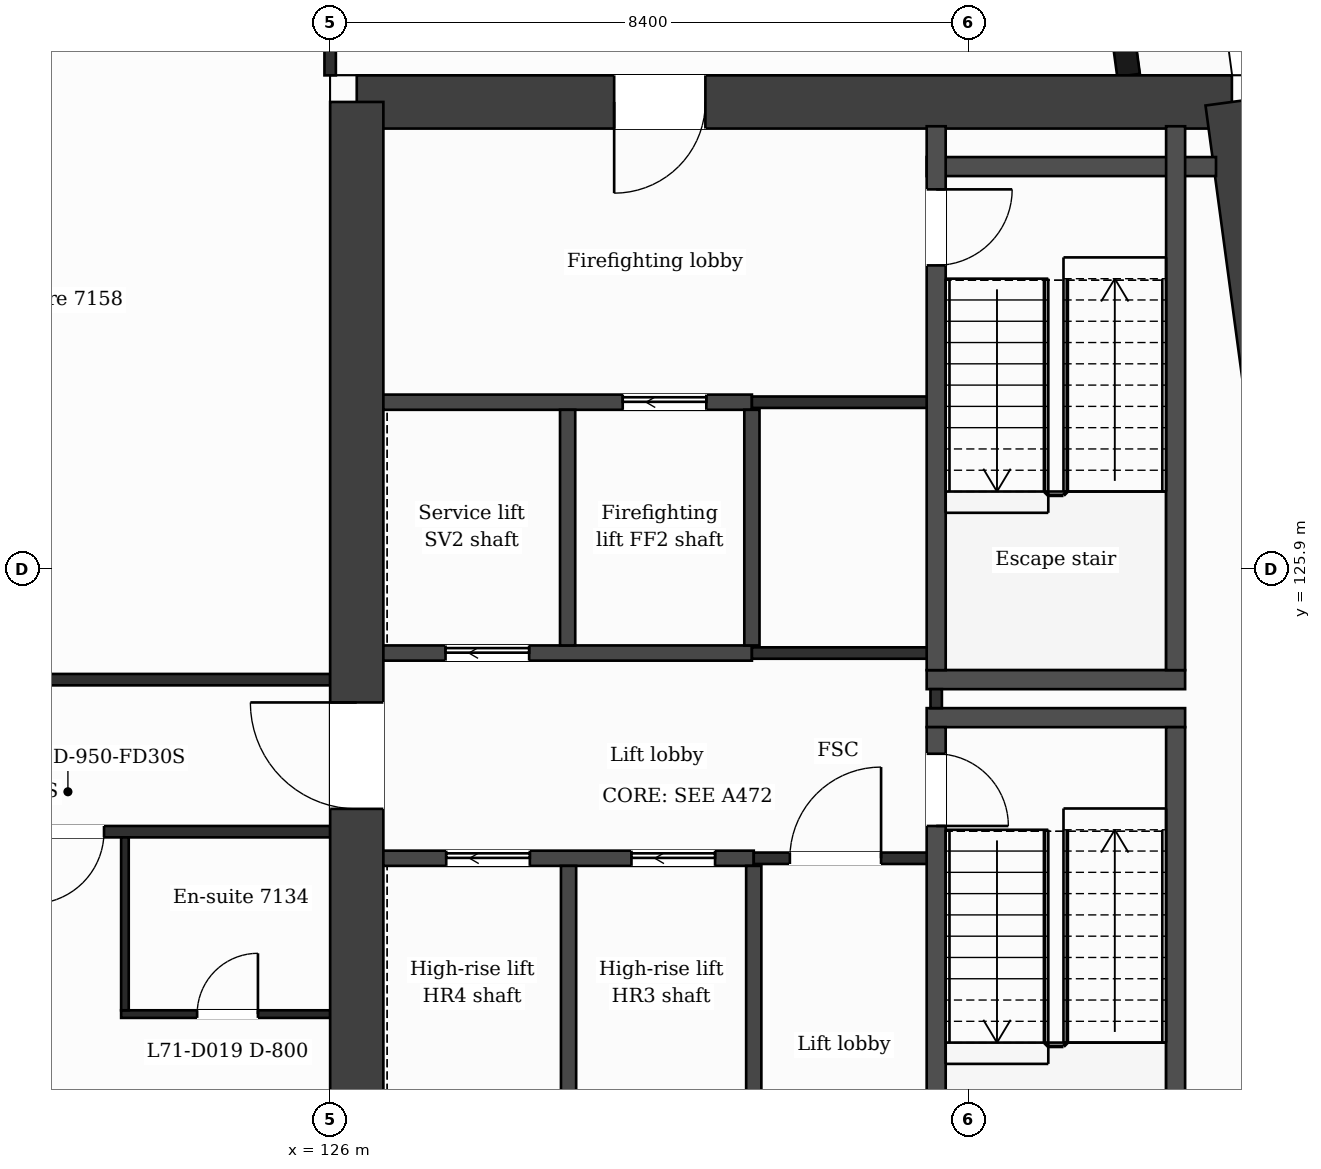
"""IFC4 building model, lengths in metres.
Left out: names, types, materials, properties, quantities, classifications, styles, units other than length and angle.
Written with IfcOpenShell. Run it as: python <this file> out.ifc"""

import sys

from ifc_helpers import new_model, si_unit, direction, frame, frame_2d, origin, place, context, subcontext, project, spatial, rectangle, extrude, element, fill, save


model = new_model("IFC4")
c1 = context("Model", 3, precision=1e-05, world=origin(), true_north=direction((0.0, 1.0)))
c2 = subcontext(c1, "Body", "Model", "MODEL_VIEW")
j1 = project(units=[si_unit("LENGTHUNIT", "METRE"), si_unit("PLANEANGLEUNIT", "RADIAN")], contexts=[c1])
p1 = place(None, origin())
s1 = spatial("IfcSite", under=j1, at=p1, CompositionType="ELEMENT")
p2 = place(p1, origin())
s2 = spatial("IfcBuilding", under=s1, at=p2, CompositionType="ELEMENT")
p3 = place(p2, frame((0.0, 0.0, 292.3)))
s3 = spatial("IfcBuildingStorey", under=s2, at=p3, CompositionType="ELEMENT", Elevation=292.3)
p4 = place(p3, frame((126.35, 132.05, 0.0), z_axis=(0.0, 0.0, 1.0), x_axis=(1.0, 0.0, 0.0)))
e1 = element("IfcWall", 1, at=p4, inside=s3, PredefinedType="SHEAR", context=c2, shape_type="SweptSolid", body=[
    extrude(rectangle(XDim=11.513, YDim=0.7, at=frame_2d((5.757, 0.0))), origin(), (0.0, 0.0, 1.0), 3.7),
])
p5 = place(p4, frame((3.386, 0.0, 0.0)))
e2 = element("IfcOpeningElement", 2, at=p5, cuts=e1, PredefinedType="OPENING", context=c2, shape_type="SweptSolid", body=[
    extrude(rectangle(XDim=1.2, YDim=2.1, at=frame_2d((0.6, 1.05))), frame((0.0, 0.36, 0.0), z_axis=(0.0, -1.0, 0.0), x_axis=(1.0, 0.0, 0.0)), (0.0, 0.0, 1.0), 0.72),
])
p6 = place(p3, frame((137.863, 132.05, 0.0), z_axis=(0.0, 0.0, 1.0), x_axis=(0.133401241494, -0.991062111458, 0.0)))
e3 = element("IfcWall", 3, at=p6, inside=s3, PredefinedType="SHEAR", context=c2, shape_type="SweptSolid", body=[
    extrude(rectangle(XDim=15.842, YDim=0.7, at=frame_2d((7.921, 0.0))), origin(), (0.0, 0.0, 1.0), 3.7),
])
p7 = place(p3, frame((126.35, 116.35, 0.0), z_axis=(0.0, 0.0, 1.0), x_axis=(0.0, 1.0, 0.0)))
e4 = element("IfcWall", 4, at=p7, inside=s3, PredefinedType="SHEAR", context=c2, shape_type="SweptSolid", body=[
    extrude(rectangle(XDim=15.7, YDim=0.7, at=frame_2d((7.85, 0.0))), origin(), (0.0, 0.0, 1.0), 3.7),
])
p8 = place(p7, frame((6.4, 0.0, 0.0)))
e5 = element("IfcOpeningElement", 5, at=p8, cuts=e4, PredefinedType="OPENING", context=c2, shape_type="SweptSolid", body=[
    extrude(rectangle(XDim=1.4, YDim=2.1, at=frame_2d((0.7, 1.05))), frame((0.0, 0.36, 0.0), z_axis=(0.0, -1.0, 0.0), x_axis=(1.0, 0.0, 0.0)), (0.0, 0.0, 1.0), 0.72),
])
p9 = place(p3, frame((136.504, 132.4, 0.0), z_axis=(0.0, 0.0, 1.0), x_axis=(-0.133399697462, 0.99106231929, 0.0)))
e6 = element("IfcWall", 6, at=p9, inside=s3, PredefinedType="SOLIDWALL", context=c2, shape_type="SweptSolid", body=[
    extrude(rectangle(XDim=6.74, YDim=0.3, at=frame_2d((3.37, 0.0))), origin(), (0.0, 0.0, 1.0), 3.38),
])
p10 = place(p9, frame((1.115, 0.0, 0.0)))
e7 = element("IfcOpeningElement", 7, at=p10, cuts=e6, PredefinedType="OPENING", context=c2, shape_type="SweptSolid", body=[
    extrude(rectangle(XDim=1.2, YDim=2.4, at=frame_2d((0.6, 1.2))), frame((0.0, 0.16, 0.0), z_axis=(0.0, -1.0, 0.0), x_axis=(1.0, 0.0, 0.0)), (0.0, 0.0, 1.0), 0.32),
])
p11 = place(p9, frame((3.835, 0.0, 0.9)))
e8 = element("IfcOpeningElement", 8, at=p11, cuts=e6, PredefinedType="OPENING", context=c2, shape_type="SweptSolid", body=[
    extrude(rectangle(XDim=2.4, YDim=2.1, at=frame_2d((1.2, 1.05))), frame((0.0, 0.16, 0.0), z_axis=(0.0, -1.0, 0.0), x_axis=(1.0, 0.0, 0.0)), (0.0, 0.0, 1.0), 0.32),
])
p12 = place(p3, frame((123.25, 120.05, 0.0), z_axis=(0.0, 0.0, 1.0), x_axis=(1.0, 0.0, 0.0)))
e9 = element("IfcWall", 9, at=p12, inside=s3, PredefinedType="PARTITIONING", context=c2, shape_type="SweptSolid", body=[
    extrude(rectangle(XDim=2.75, YDim=0.1, at=frame_2d((1.375, 0.0))), origin(), (0.0, 0.0, 1.0), 3.38),
])
p13 = place(p12, frame((1.0, 0.0, 0.0)))
e10 = element("IfcOpeningElement", 10, at=p13, cuts=e9, PredefinedType="OPENING", context=c2, shape_type="SweptSolid", body=[
    extrude(rectangle(XDim=0.8, YDim=2.1, at=frame_2d((0.4, 1.05))), frame((0.0, 0.06, 0.0), z_axis=(0.0, -1.0, 0.0), x_axis=(1.0, 0.0, 0.0)), (0.0, 0.0, 1.0), 0.12),
])
p14 = place(p3, frame((126.7, 122.1, 0.0), z_axis=(0.0, 0.0, 1.0), x_axis=(1.0, 0.0, 0.0)))
e11 = element("IfcWall", 11, at=p14, inside=s3, PredefinedType="PARTITIONING", context=c2, shape_type="SweptSolid", body=[
    extrude(rectangle(XDim=4.873, YDim=0.2, at=frame_2d((2.437, 0.0))), origin(), (0.0, 0.0, 1.0), 3.38),
])
p15 = place(p14, frame((3.264, 0.0, 0.0)))
e12 = element("IfcOpeningElement", 12, at=p15, cuts=e11, PredefinedType="OPENING", context=c2, shape_type="SweptSolid", body=[
    extrude(rectangle(XDim=1.1, YDim=2.1, at=frame_2d((0.55, 1.05))), frame((0.0, 0.11, 0.0), z_axis=(0.0, -1.0, 0.0), x_axis=(1.0, 0.0, 0.0)), (0.0, 0.0, 1.0), 0.22),
])
p16 = place(p14, frame((0.827, 0.0, 0.0)))
e13 = element("IfcOpeningElement", 13, at=p16, cuts=e11, PredefinedType="OPENING", context=c2, shape_type="SweptSolid", body=[
    extrude(rectangle(XDim=1.1, YDim=2.1, at=frame_2d((0.55, 1.05))), frame((0.0, 0.11, 0.0), z_axis=(0.0, -1.0, 0.0), x_axis=(1.0, 0.0, 0.0)), (0.0, 0.0, 1.0), 0.22),
])
p17 = place(p3, frame((131.573, 122.1, 0.0), z_axis=(0.0, 0.0, 1.0), x_axis=(1.0, 0.0, 0.0)))
e14 = element("IfcWall", 14, at=p17, inside=s3, PredefinedType="PARTITIONING", context=c2, shape_type="SweptSolid", body=[
    extrude(rectangle(XDim=2.4, YDim=0.15, at=frame_2d((1.2, 0.0))), origin(), (0.0, 0.0, 1.0), 3.38),
])
p18 = place(p17, frame((0.475, 0.0, 0.0)))
e15 = element("IfcOpeningElement", 15, at=p18, cuts=e14, PredefinedType="OPENING", context=c2, shape_type="SweptSolid", body=[
    extrude(rectangle(XDim=1.2, YDim=2.1, at=frame_2d((0.6, 1.05))), frame((0.0, 0.085, 0.0), z_axis=(0.0, -1.0, 0.0), x_axis=(1.0, 0.0, 0.0)), (0.0, 0.0, 1.0), 0.17),
])
p19 = place(p3, frame((100.8, 122.45, 0.0), z_axis=(0.0, 0.0, 1.0), x_axis=(1.0, 0.0, 0.0)))
e16 = element("IfcWall", 16, at=p19, inside=s3, PredefinedType="PARTITIONING", context=c2, shape_type="SweptSolid", body=[
    extrude(rectangle(XDim=25.2, YDim=0.15, at=frame_2d((12.6, 0.0))), origin(), (0.0, 0.0, 1.0), 3.38),
])
p20 = place(p19, frame((1.6, 0.0, 0.0)))
e17 = element("IfcOpeningElement", 17, at=p20, cuts=e16, PredefinedType="OPENING", context=c2, shape_type="SweptSolid", body=[
    extrude(rectangle(XDim=1.0, YDim=2.1, at=frame_2d((0.5, 1.05))), frame((0.0, 0.085, 0.0), z_axis=(0.0, -1.0, 0.0), x_axis=(1.0, 0.0, 0.0)), (0.0, 0.0, 1.0), 0.17),
])
p21 = place(p19, frame((11.12, 0.0, 0.0)))
e18 = element("IfcOpeningElement", 18, at=p21, cuts=e16, PredefinedType="OPENING", context=c2, shape_type="SweptSolid", body=[
    extrude(rectangle(XDim=0.95, YDim=2.1, at=frame_2d((0.475, 1.05))), frame((0.0, 0.085, 0.0), z_axis=(0.0, -1.0, 0.0), x_axis=(1.0, 0.0, 0.0)), (0.0, 0.0, 1.0), 0.17),
])
p22 = place(p19, frame((13.05, 0.0, 0.0)))
e19 = element("IfcOpeningElement", 19, at=p22, cuts=e16, PredefinedType="OPENING", context=c2, shape_type="SweptSolid", body=[
    extrude(rectangle(XDim=1.0, YDim=2.1, at=frame_2d((0.5, 1.05))), frame((0.0, 0.085, 0.0), z_axis=(0.0, -1.0, 0.0), x_axis=(1.0, 0.0, 0.0)), (0.0, 0.0, 1.0), 0.17),
])
p23 = place(p19, frame((19.61, 0.0, 0.0)))
e20 = element("IfcOpeningElement", 20, at=p23, cuts=e16, PredefinedType="OPENING", context=c2, shape_type="SweptSolid", body=[
    extrude(rectangle(XDim=0.95, YDim=2.1, at=frame_2d((0.475, 1.05))), frame((0.0, 0.085, 0.0), z_axis=(0.0, -1.0, 0.0), x_axis=(1.0, 0.0, 0.0)), (0.0, 0.0, 1.0), 0.17),
])
p24 = place(p19, frame((21.275, 0.0, 0.0)))
e21 = element("IfcOpeningElement", 21, at=p24, cuts=e16, PredefinedType="OPENING", context=c2, shape_type="SweptSolid", body=[
    extrude(rectangle(XDim=0.95, YDim=2.1, at=frame_2d((0.475, 1.05))), frame((0.0, 0.085, 0.0), z_axis=(0.0, -1.0, 0.0), x_axis=(1.0, 0.0, 0.0)), (0.0, 0.0, 1.0), 0.17),
])
for number, where, z_axis, x_axis in (
    (22, (133.848, 123.95, 0.0), (0.0, 0.0, 1.0), (1.0, 0.0, 0.0)),
    (23, (133.848, 124.45, 0.0), (0.0, 0.0, 1.0), (1.0, 0.0, 0.0)),
):
    element("IfcWall", number, at=place(p3, frame(where, z_axis=z_axis, x_axis=x_axis)), inside=s3, PredefinedType="PARTITIONING", context=c2, shape_type="SweptSolid", body=[
        extrude(rectangle(XDim=3.4, YDim=0.25, at=frame_2d((1.7, 0.0))), origin(), (0.0, 0.0, 1.0), 3.38),
    ])
p25 = place(p3, frame((100.8, 124.45, 0.0), z_axis=(0.0, 0.0, 1.0), x_axis=(1.0, 0.0, 0.0)))
e24 = element("IfcWall", 24, at=p25, inside=s3, PredefinedType="PARTITIONING", context=c2, shape_type="SweptSolid", body=[
    extrude(rectangle(XDim=25.2, YDim=0.15, at=frame_2d((12.6, 0.0))), origin(), (0.0, 0.0, 1.0), 3.38),
])
p26 = place(p25, frame((1.85, 0.0, 0.0)))
e25 = element("IfcOpeningElement", 25, at=p26, cuts=e24, PredefinedType="OPENING", context=c2, shape_type="SweptSolid", body=[
    extrude(rectangle(XDim=1.0, YDim=2.1, at=frame_2d((0.5, 1.05))), frame((0.0, 0.085, 0.0), z_axis=(0.0, -1.0, 0.0), x_axis=(1.0, 0.0, 0.0)), (0.0, 0.0, 1.0), 0.17),
])
p27 = place(p25, frame((6.425, 0.0, 0.0)))
e26 = element("IfcOpeningElement", 26, at=p27, cuts=e24, PredefinedType="OPENING", context=c2, shape_type="SweptSolid", body=[
    extrude(rectangle(XDim=1.0, YDim=2.1, at=frame_2d((0.5, 1.05))), frame((0.0, 0.085, 0.0), z_axis=(0.0, -1.0, 0.0), x_axis=(1.0, 0.0, 0.0)), (0.0, 0.0, 1.0), 0.17),
])
p28 = place(p25, frame((9.4, 0.0, 0.0)))
e27 = element("IfcOpeningElement", 27, at=p28, cuts=e24, PredefinedType="OPENING", context=c2, shape_type="SweptSolid", body=[
    extrude(rectangle(XDim=1.0, YDim=2.1, at=frame_2d((0.5, 1.05))), frame((0.0, 0.085, 0.0), z_axis=(0.0, -1.0, 0.0), x_axis=(1.0, 0.0, 0.0)), (0.0, 0.0, 1.0), 0.17),
])
p29 = place(p25, frame((14.825, 0.0, 0.0)))
e28 = element("IfcOpeningElement", 28, at=p29, cuts=e24, PredefinedType="OPENING", context=c2, shape_type="SweptSolid", body=[
    extrude(rectangle(XDim=1.0, YDim=2.1, at=frame_2d((0.5, 1.05))), frame((0.0, 0.085, 0.0), z_axis=(0.0, -1.0, 0.0), x_axis=(1.0, 0.0, 0.0)), (0.0, 0.0, 1.0), 0.17),
])
p30 = place(p25, frame((18.825, 0.0, 0.0)))
e29 = element("IfcOpeningElement", 29, at=p30, cuts=e24, PredefinedType="OPENING", context=c2, shape_type="SweptSolid", body=[
    extrude(rectangle(XDim=1.0, YDim=2.1, at=frame_2d((0.5, 1.05))), frame((0.0, 0.085, 0.0), z_axis=(0.0, -1.0, 0.0), x_axis=(1.0, 0.0, 0.0)), (0.0, 0.0, 1.0), 0.17),
])
p31 = place(p3, frame((126.7, 124.8, 0.0), z_axis=(0.0, 0.0, 1.0), x_axis=(1.0, 0.0, 0.0)))
e30 = element("IfcWall", 30, at=p31, inside=s3, PredefinedType="PARTITIONING", context=c2, shape_type="SweptSolid", body=[
    extrude(rectangle(XDim=4.849, YDim=0.2, at=frame_2d((2.424, 0.0))), origin(), (0.0, 0.0, 1.0), 3.38),
])
p32 = place(p31, frame((0.818, 0.0, 0.0)))
e31 = element("IfcOpeningElement", 31, at=p32, cuts=e30, PredefinedType="OPENING", context=c2, shape_type="SweptSolid", body=[
    extrude(rectangle(XDim=1.1, YDim=2.1, at=frame_2d((0.55, 1.05))), frame((0.0, 0.11, 0.0), z_axis=(0.0, -1.0, 0.0), x_axis=(1.0, 0.0, 0.0)), (0.0, 0.0, 1.0), 0.22),
])
p33 = place(p3, frame((131.549, 124.8, 0.0), z_axis=(0.0, 0.0, 1.0), x_axis=(1.0, 0.0, 0.0)))
e32 = element("IfcWall", 32, at=p33, inside=s3, PredefinedType="PARTITIONING", context=c2, shape_type="SweptSolid", body=[
    extrude(rectangle(XDim=2.549, YDim=0.15, at=frame_2d((1.275, 0.0))), origin(), (0.0, 0.0, 1.0), 3.38),
])
p34 = place(p3, frame((126.7, 128.1, 0.0), z_axis=(0.0, 0.0, 1.0), x_axis=(1.0, 0.0, 0.0)))
e33 = element("IfcWall", 33, at=p34, inside=s3, PredefinedType="PARTITIONING", context=c2, shape_type="SweptSolid", body=[
    extrude(rectangle(XDim=4.849, YDim=0.2, at=frame_2d((2.424, 0.0))), origin(), (0.0, 0.0, 1.0), 3.38),
])
p35 = place(p34, frame((3.149, 0.0, 0.0)))
e34 = element("IfcOpeningElement", 34, at=p35, cuts=e33, PredefinedType="OPENING", context=c2, shape_type="SweptSolid", body=[
    extrude(rectangle(XDim=1.1, YDim=2.1, at=frame_2d((0.55, 1.05))), frame((0.0, 0.11, 0.0), z_axis=(0.0, -1.0, 0.0), x_axis=(1.0, 0.0, 0.0)), (0.0, 0.0, 1.0), 0.22),
])
p36 = place(p3, frame((131.549, 128.1, 0.0), z_axis=(0.0, 0.0, 1.0), x_axis=(1.0, 0.0, 0.0)))
e35 = element("IfcWall", 35, at=p36, inside=s3, PredefinedType="PARTITIONING", context=c2, shape_type="SweptSolid", body=[
    extrude(rectangle(XDim=2.424, YDim=0.15, at=frame_2d((1.212, 0.0))), origin(), (0.0, 0.0, 1.0), 3.38),
])
p37 = place(p3, frame((133.848, 131.2, 0.0), z_axis=(0.0, 0.0, 1.0), x_axis=(1.0, 0.0, 0.0)))
e36 = element("IfcWall", 36, at=p37, inside=s3, PredefinedType="PARTITIONING", context=c2, shape_type="SweptSolid", body=[
    extrude(rectangle(XDim=3.807, YDim=0.25, at=frame_2d((1.903, 0.0))), origin(), (0.0, 0.0, 1.0), 3.38),
])
p38 = place(p3, frame((123.3, 120.1, 0.0), z_axis=(0.0, 0.0, 1.0), x_axis=(0.0, 1.0, 0.0)))
e37 = element("IfcWall", 37, at=p38, inside=s3, PredefinedType="PARTITIONING", context=c2, shape_type="SweptSolid", body=[
    extrude(rectangle(XDim=2.275, YDim=0.1, at=frame_2d((1.137, 0.0))), origin(), (0.0, 0.0, 1.0), 3.38),
])
p39 = place(p3, frame((126.0, 132.4, 0.0), z_axis=(0.0, 0.0, 1.0), x_axis=(0.0, 1.0, 0.0)))
e38 = element("IfcWall", 38, at=p39, inside=s3, PredefinedType="PARTITIONING", context=c2, shape_type="SweptSolid", body=[
    extrude(rectangle(XDim=1.325, YDim=0.15, at=frame_2d((0.663, 0.0))), origin(), (0.0, 0.0, 1.0), 3.38),
])
for number, where, z_axis, x_axis in (
    (39, (129.124, 124.9, 0.0), (0.0, 0.0, 1.0), (0.0, 1.0, 0.0)),
    (40, (129.136, 118.9, 0.0), (0.0, 0.0, 1.0), (0.0, 1.0, 0.0)),
    (41, (131.549, 124.9, 0.0), (0.0, 0.0, 1.0), (0.0, 1.0, 0.0)),
):
    element("IfcWall", number, at=place(p3, frame(where, z_axis=z_axis, x_axis=x_axis)), inside=s3, PredefinedType="PARTITIONING", context=c2, shape_type="SweptSolid", body=[
        extrude(rectangle(XDim=3.1, YDim=0.2, at=frame_2d((1.55, 0.0))), origin(), (0.0, 0.0, 1.0), 3.38),
    ])
p40 = place(p3, frame((131.573, 116.67, 0.0), z_axis=(0.0, 0.0, 1.0), x_axis=(0.0, 1.0, 0.0)))
e42 = element("IfcWall", 42, at=p40, inside=s3, PredefinedType="PARTITIONING", context=c2, shape_type="SweptSolid", body=[
    extrude(rectangle(XDim=5.33, YDim=0.2, at=frame_2d((2.665, 0.0))), origin(), (0.0, 0.0, 1.0), 3.38),
])
p41 = place(p40, frame((0.88, 0.0, 0.0)))
e43 = element("IfcOpeningElement", 43, at=p41, cuts=e42, PredefinedType="OPENING", context=c2, shape_type="SweptSolid", body=[
    extrude(rectangle(XDim=0.9, YDim=2.1, at=frame_2d((0.45, 1.05))), frame((0.0, 0.11, 0.0), z_axis=(0.0, -1.0, 0.0), x_axis=(1.0, 0.0, 0.0)), (0.0, 0.0, 1.0), 0.22),
])
p42 = place(p3, frame((133.973, 124.075, 0.0), z_axis=(0.0, 0.0, 1.0), x_axis=(0.0, 1.0, 0.0)))
e44 = element("IfcWall", 44, at=p42, inside=s3, PredefinedType="PARTITIONING", context=c2, shape_type="SweptSolid", body=[
    extrude(rectangle(XDim=0.25, YDim=0.15, at=frame_2d((0.125, 0.0))), origin(), (0.0, 0.0, 1.0), 3.38),
])
p43 = place(p3, frame((133.973, 116.67, 0.0), z_axis=(0.0, 0.0, 1.0), x_axis=(0.0, 1.0, 0.0)))
e45 = element("IfcWall", 45, at=p43, inside=s3, PredefinedType="PARTITIONING", context=c2, shape_type="SweptSolid", body=[
    extrude(rectangle(XDim=7.155, YDim=0.25, at=frame_2d((3.578, 0.0))), origin(), (0.0, 0.0, 1.0), 3.38),
])
p44 = place(p43, frame((5.855, 0.0, 0.0)))
e46 = element("IfcOpeningElement", 46, at=p44, cuts=e45, PredefinedType="OPENING", context=c2, shape_type="SweptSolid", body=[
    extrude(rectangle(XDim=0.95, YDim=2.1, at=frame_2d((0.475, 1.05))), frame((0.0, 0.135, 0.0), z_axis=(0.0, -1.0, 0.0), x_axis=(1.0, 0.0, 0.0)), (0.0, 0.0, 1.0), 0.27),
])
p45 = place(p3, frame((133.973, 124.575, 0.0), z_axis=(0.0, 0.0, 1.0), x_axis=(0.0, 1.0, 0.0)))
e47 = element("IfcWall", 47, at=p45, inside=s3, PredefinedType="PARTITIONING", context=c2, shape_type="SweptSolid", body=[
    extrude(rectangle(XDim=7.155, YDim=0.25, at=frame_2d((3.578, 0.0))), origin(), (0.0, 0.0, 1.0), 3.38),
])
p46 = place(p45, frame((5.325, 0.0, 0.0)))
e48 = element("IfcOpeningElement", 48, at=p46, cuts=e47, PredefinedType="OPENING", context=c2, shape_type="SweptSolid", body=[
    extrude(rectangle(XDim=1.0, YDim=2.1, at=frame_2d((0.5, 1.05))), frame((0.0, 0.135, 0.0), z_axis=(0.0, -1.0, 0.0), x_axis=(1.0, 0.0, 0.0)), (0.0, 0.0, 1.0), 0.27),
])
for number, where, z_axis, x_axis in (
    (49, (137.123, 116.67, 0.0), (0.0, 0.0, 1.0), (0.0, 1.0, 0.0)),
    (50, (137.123, 124.575, 0.0), (0.0, 0.0, 1.0), (0.0, 1.0, 0.0)),
):
    element("IfcWall", number, at=place(p3, frame(where, z_axis=z_axis, x_axis=x_axis)), inside=s3, PredefinedType="PARTITIONING", context=c2, shape_type="SweptSolid", body=[
        extrude(rectangle(XDim=7.155, YDim=0.25, at=frame_2d((3.578, 0.0))), origin(), (0.0, 0.0, 1.0), 3.38),
    ])
p47 = place(p18, origin())
e51 = element("IfcDoor", 51, at=p47, inside=s3, OperationType="SINGLE_SWING_RIGHT", PredefinedType="DOOR", context=c2, shape_type="SweptSolid", body=[
    extrude(rectangle(XDim=1.2, YDim=2.1, at=frame_2d((0.6, 1.05))), frame((0.0, 0.025, 0.0), z_axis=(0.0, -1.0, 0.0), x_axis=(1.0, 0.0, 0.0)), (0.0, 0.0, 1.0), 0.05),
])
fill(e15, e51)
p48 = place(p15, origin())
e52 = element("IfcDoor", 52, at=p48, inside=s3, OperationType="SLIDING_TO_LEFT", PredefinedType="DOOR", context=c2, shape_type="SweptSolid", body=[
    extrude(rectangle(XDim=1.1, YDim=2.1, at=frame_2d((0.55, 1.05))), frame((0.0, 0.025, 0.0), z_axis=(0.0, -1.0, 0.0), x_axis=(1.0, 0.0, 0.0)), (0.0, 0.0, 1.0), 0.05),
])
fill(e12, e52)
p49 = place(p16, origin())
e53 = element("IfcDoor", 53, at=p49, inside=s3, OperationType="SLIDING_TO_LEFT", PredefinedType="DOOR", context=c2, shape_type="SweptSolid", body=[
    extrude(rectangle(XDim=1.1, YDim=2.1, at=frame_2d((0.55, 1.05))), frame((0.0, 0.025, 0.0), z_axis=(0.0, -1.0, 0.0), x_axis=(1.0, 0.0, 0.0)), (0.0, 0.0, 1.0), 0.05),
])
fill(e13, e53)
p50 = place(p35, origin())
e54 = element("IfcDoor", 54, at=p50, inside=s3, OperationType="SLIDING_TO_LEFT", PredefinedType="DOOR", context=c2, shape_type="SweptSolid", body=[
    extrude(rectangle(XDim=1.1, YDim=2.1, at=frame_2d((0.55, 1.05))), frame((0.0, 0.025, 0.0), z_axis=(0.0, -1.0, 0.0), x_axis=(1.0, 0.0, 0.0)), (0.0, 0.0, 1.0), 0.05),
])
fill(e34, e54)
p51 = place(p32, origin())
e55 = element("IfcDoor", 55, at=p51, inside=s3, OperationType="SLIDING_TO_LEFT", PredefinedType="DOOR", context=c2, shape_type="SweptSolid", body=[
    extrude(rectangle(XDim=1.1, YDim=2.1, at=frame_2d((0.55, 1.05))), frame((0.0, 0.025, 0.0), z_axis=(0.0, -1.0, 0.0), x_axis=(1.0, 0.0, 0.0)), (0.0, 0.0, 1.0), 0.05),
])
fill(e31, e55)
p52 = place(p44, origin())
e56 = element("IfcDoor", 56, at=p52, inside=s3, OperationType="SINGLE_SWING_LEFT", PredefinedType="DOOR", context=c2, shape_type="SweptSolid", body=[
    extrude(rectangle(XDim=0.95, YDim=2.1, at=frame_2d((0.475, 1.05))), frame((0.0, 0.025, 0.0), z_axis=(0.0, -1.0, 0.0), x_axis=(1.0, 0.0, 0.0)), (0.0, 0.0, 1.0), 0.05),
])
fill(e46, e56)
p53 = place(p46, origin())
e57 = element("IfcDoor", 57, at=p53, inside=s3, OperationType="SINGLE_SWING_RIGHT", PredefinedType="DOOR", context=c2, shape_type="SweptSolid", body=[
    extrude(rectangle(XDim=1.0, YDim=2.1, at=frame_2d((0.5, 1.05))), frame((0.0, 0.025, 0.0), z_axis=(0.0, -1.0, 0.0), x_axis=(1.0, 0.0, 0.0)), (0.0, 0.0, 1.0), 0.05),
])
fill(e48, e57)
p54 = place(p24, origin())
e58 = element("IfcDoor", 58, at=p54, inside=s3, OperationType="SINGLE_SWING_LEFT", PredefinedType="DOOR", context=c2, shape_type="SweptSolid", body=[
    extrude(rectangle(XDim=0.95, YDim=2.1, at=frame_2d((0.475, 1.05))), frame((0.0, 0.025, 0.0), z_axis=(0.0, -1.0, 0.0), x_axis=(1.0, 0.0, 0.0)), (0.0, 0.0, 1.0), 0.05),
])
fill(e21, e58)
p55 = place(p13, origin())
e59 = element("IfcDoor", 59, at=p55, inside=s3, OperationType="SINGLE_SWING_RIGHT", PredefinedType="DOOR", context=c2, shape_type="SweptSolid", body=[
    extrude(rectangle(XDim=0.8, YDim=2.1, at=frame_2d((0.4, 1.05))), frame((0.0, 0.025, 0.0), z_axis=(0.0, -1.0, 0.0), x_axis=(1.0, 0.0, 0.0)), (0.0, 0.0, 1.0), 0.05),
])
fill(e10, e59)
p56 = place(p5, origin())
e60 = element("IfcDoor", 60, at=p56, inside=s3, OperationType="SINGLE_SWING_LEFT", PredefinedType="DOOR", context=c2, shape_type="SweptSolid", body=[
    extrude(rectangle(XDim=1.2, YDim=2.1, at=frame_2d((0.6, 1.05))), frame((0.0, 0.025, 0.0), z_axis=(0.0, -1.0, 0.0), x_axis=(1.0, 0.0, 0.0)), (0.0, 0.0, 1.0), 0.05),
])
fill(e2, e60)
p57 = place(p8, origin())
e61 = element("IfcDoor", 61, at=p57, inside=s3, OperationType="SINGLE_SWING_RIGHT", PredefinedType="DOOR", context=c2, shape_type="SweptSolid", body=[
    extrude(rectangle(XDim=1.4, YDim=2.1, at=frame_2d((0.7, 1.05))), frame((0.0, 0.025, 0.0), z_axis=(0.0, -1.0, 0.0), x_axis=(1.0, 0.0, 0.0)), (0.0, 0.0, 1.0), 0.05),
])
fill(e5, e61)
save(model, sys.argv[1])
